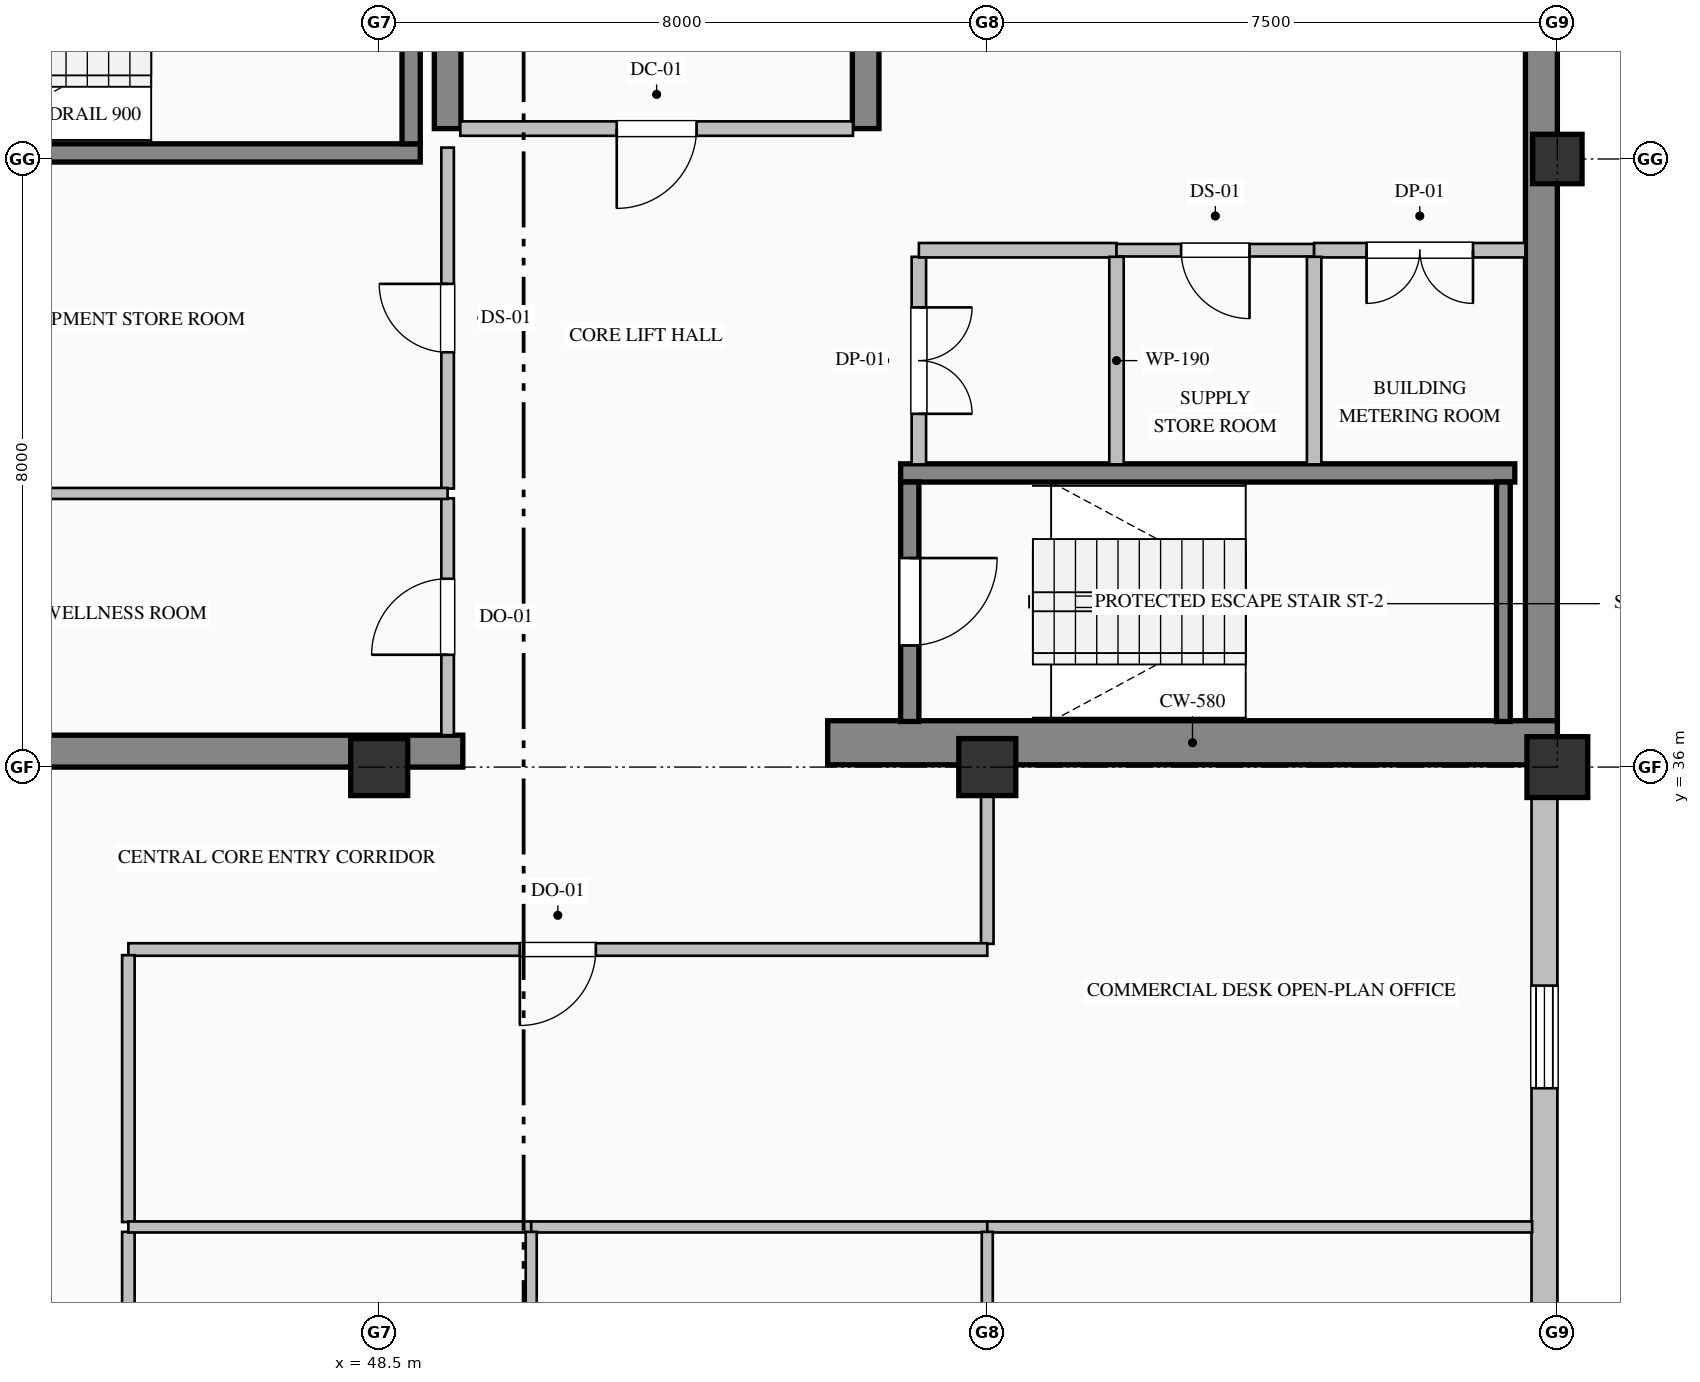
"""IFC4 building model, lengths in metres.
Left out: names, types, materials, properties, quantities, classifications, styles, units other than length and angle.
Written with IfcOpenShell. Run it as: python <this file> out.ifc"""

import sys

from ifc_helpers import new_model, si_unit, direction, frame, frame_2d, origin, origin_2d, place, context, subcontext, project, spatial, rectangle, hollow_rectangle, extrude, element, fill, save


model = new_model("IFC4")
c1 = context("Model", 3, precision=1e-05, world=origin(), true_north=direction((0.0, 1.0)))
c2 = subcontext(c1, "Body", "Model", "MODEL_VIEW")
j1 = project(units=[si_unit("LENGTHUNIT", "METRE"), si_unit("PLANEANGLEUNIT", "RADIAN")], contexts=[c1])
p1 = place(None, origin())
s1 = spatial("IfcSite", under=j1, at=p1, CompositionType="ELEMENT")
p2 = place(p1, origin())
s2 = spatial("IfcBuilding", under=s1, at=p2, CompositionType="ELEMENT")
p3 = place(p2, frame((0.0, 0.0, 355.2)))
s3 = spatial("IfcBuildingStorey", under=s2, at=p3, CompositionType="ELEMENT", Elevation=355.2)
p4 = place(p3, frame((63.79, 36.32, 0.0), z_axis=(0.0, 0.0, 1.0), x_axis=(0.0, 1.0, 0.0)))
e1 = element("IfcWall", 1, at=p4, inside=s3, PredefinedType="SHEAR", context=c2, shape_type="SweptSolid", body=[
    extrude(rectangle(XDim=15.26, YDim=0.42, at=frame_2d((7.63, 0.0))), origin(), (0.0, 0.0, 1.0), 3.785),
])
p5 = place(p3, frame((40.5, 36.21, 0.0), z_axis=(0.0, 0.0, 1.0), x_axis=(1.0, 0.0, 0.0)))
e2 = element("IfcWall", 2, at=p5, inside=s3, PredefinedType="SHEAR", context=c2, shape_type="SweptSolid", body=[
    extrude(rectangle(XDim=9.1, YDim=0.42, at=frame_2d((4.55, 0.0))), origin(), (0.0, 0.0, 1.0), 3.785),
])
p6 = place(p3, frame((54.4, 36.32, 0.0), z_axis=(0.0, 0.0, 1.0), x_axis=(1.0, 0.0, 0.0)))
e3 = element("IfcWall", 3, at=p6, inside=s3, PredefinedType="SHEAR", context=c2, shape_type="SweptSolid", body=[
    extrude(rectangle(XDim=9.6, YDim=0.58, at=frame_2d((4.8, 0.0))), origin(), (0.0, 0.0, 1.0), 4.0),
])
p7 = place(p3, frame((49.4, 44.4, 0.0), z_axis=(0.0, 0.0, 1.0), x_axis=(0.0, 1.0, 0.0)))
e4 = element("IfcWall", 4, at=p7, inside=s3, PredefinedType="SHEAR", context=c2, shape_type="SweptSolid", body=[
    extrude(rectangle(XDim=3.0, YDim=0.35, at=frame_2d((1.5, 0.0))), origin(), (0.0, 0.0, 1.0), 3.785),
])
p8 = place(p3, frame((54.9, 44.4, 0.0), z_axis=(0.0, 0.0, 1.0), x_axis=(0.0, 1.0, 0.0)))
e5 = element("IfcWall", 5, at=p8, inside=s3, PredefinedType="SHEAR", context=c2, shape_type="SweptSolid", body=[
    extrude(rectangle(XDim=7.18, YDim=0.35, at=frame_2d((3.59, 0.0))), origin(), (0.0, 0.0, 1.0), 3.785),
])
for number, where, z_axis, x_axis in (
    (6, (48.5, 36.0, 0.0), (0.0, 0.0, 1.0), (1.0, 0.0, 0.0)),
    (7, (56.5, 36.0, 0.0), (0.0, 0.0, 1.0), (1.0, 0.0, 0.0)),
):
    element("IfcColumn", number, at=place(p3, frame(where, z_axis=z_axis, x_axis=x_axis)), inside=s3, PredefinedType="COLUMN", context=c2, shape_type="SweptSolid", body=[
        extrude(rectangle(XDim=0.75, YDim=0.75, at=origin_2d()), origin(), (0.0, 0.0, 1.0), 4.0),
    ])
p9 = place(p3, frame((64.0, 36.0, 0.0), z_axis=(0.0, 0.0, 1.0), x_axis=(1.0, 0.0, 0.0)))
e8 = element("IfcColumn", 8, at=p9, inside=s3, PredefinedType="COLUMN", context=c2, shape_type="SweptSolid", body=[
    extrude(hollow_rectangle(XDim=0.8, YDim=0.8, WallThickness=0.032, at=origin_2d()), origin(), (0.0, 0.0, 1.0), 4.0),
])
p10 = place(p3, frame((64.0, 44.0, 0.0), z_axis=(0.0, 0.0, 1.0), x_axis=(1.0, 0.0, 0.0)))
e9 = element("IfcColumn", 9, at=p10, inside=s3, PredefinedType="COLUMN", context=c2, shape_type="SweptSolid", body=[
    extrude(hollow_rectangle(XDim=0.65, YDim=0.65, WallThickness=0.028, at=origin_2d()), origin(), (0.0, 0.0, 1.0), 4.0),
])
p11 = place(p3, frame((63.83, 36.05, 0.0), z_axis=(0.0, 0.0, 1.0), x_axis=(0.0, -1.0, 0.0)))
e10 = element("IfcWall", 10, at=p11, inside=s3, PredefinedType="SOLIDWALL", context=c2, shape_type="SweptSolid", body=[
    extrude(rectangle(XDim=13.55, YDim=0.34, at=frame_2d((6.775, 0.0))), origin(), (0.0, 0.0, 1.0), 3.335),
])
p12 = place(p11, frame((2.925, 0.0, 0.9)))
e11 = element("IfcOpeningElement", 11, at=p12, cuts=e10, PredefinedType="OPENING", context=c2, shape_type="SweptSolid", body=[
    extrude(rectangle(XDim=1.35, YDim=1.85, at=frame_2d((0.675, 0.925))), frame((0.0, 0.18, 0.0), z_axis=(0.0, -1.0, 0.0), x_axis=(1.0, 0.0, 0.0)), (0.0, 0.0, 1.0), 0.36),
])
p13 = place(p3, frame((49.04, 44.08, 0.0), z_axis=(0.0, 0.0, 1.0), x_axis=(-1.0, 0.0, 0.0)))
e12 = element("IfcWall", 12, at=p13, inside=s3, PredefinedType="SOLIDWALL", context=c2, shape_type="SweptSolid", body=[
    extrude(rectangle(XDim=8.08, YDim=0.24, at=frame_2d((4.04, 0.0))), origin(), (0.0, 0.0, 1.0), 4.0),
])
p14 = place(p3, frame((48.92, 44.2, 0.0), z_axis=(0.0, 0.0, 1.0), x_axis=(0.0, 1.0, 0.0)))
e13 = element("IfcWall", 13, at=p14, inside=s3, PredefinedType="SOLIDWALL", context=c2, shape_type="SweptSolid", body=[
    extrude(rectangle(XDim=3.15, YDim=0.24, at=frame_2d((1.575, 0.0))), origin(), (0.0, 0.0, 1.0), 4.0),
])
p15 = place(p3, frame((55.36, 39.87, 0.0), z_axis=(0.0, 0.0, 1.0), x_axis=(1.0, 0.0, 0.0)))
e14 = element("IfcWall", 14, at=p15, inside=s3, PredefinedType="SOLIDWALL", context=c2, shape_type="SweptSolid", body=[
    extrude(rectangle(XDim=8.08, YDim=0.24, at=frame_2d((4.04, 0.0))), origin(), (0.0, 0.0, 1.0), 4.0),
])
p16 = place(p3, frame((55.48, 39.75, 0.0), z_axis=(0.0, 0.0, 1.0), x_axis=(0.0, -1.0, 0.0)))
e15 = element("IfcWall", 15, at=p16, inside=s3, PredefinedType="SOLIDWALL", context=c2, shape_type="SweptSolid", body=[
    extrude(rectangle(XDim=3.15, YDim=0.24, at=frame_2d((1.575, 0.0))), origin(), (0.0, 0.0, 1.0), 4.0),
])
p17 = place(p16, frame((1.0, 0.0, 0.0)))
e16 = element("IfcOpeningElement", 16, at=p17, cuts=e15, PredefinedType="OPENING", context=c2, shape_type="SweptSolid", body=[
    extrude(rectangle(XDim=1.15, YDim=2.2, at=frame_2d((0.575, 1.1))), frame((0.0, 0.13, 0.0), z_axis=(0.0, -1.0, 0.0), x_axis=(1.0, 0.0, 0.0)), (0.0, 0.0, 1.0), 0.26),
])
p18 = place(p3, frame((63.29, 36.6, 0.0), z_axis=(0.0, 0.0, 1.0), x_axis=(0.0, 1.0, 0.0)))
e17 = element("IfcWall", 17, at=p18, inside=s3, PredefinedType="SOLIDWALL", context=c2, shape_type="SweptSolid", body=[
    extrude(rectangle(XDim=3.15, YDim=0.18, at=frame_2d((1.575, 0.0))), origin(), (0.0, 0.0, 1.0), 4.0),
])
p19 = place(p3, frame((54.733, 44.4, 0.0), z_axis=(0.0, 0.0, 1.0), x_axis=(-1.0, 0.0, 0.0)))
e18 = element("IfcWall", 18, at=p19, inside=s3, PredefinedType="PARTITIONING", context=c2, shape_type="SweptSolid", body=[
    extrude(rectangle(XDim=5.166, YDim=0.19, at=frame_2d((2.583, 0.0))), origin(), (0.0, 0.0, 1.0), 3.785),
])
p20 = place(p19, frame((2.058, 0.0, 0.0)))
e19 = element("IfcOpeningElement", 19, at=p20, cuts=e18, PredefinedType="OPENING", context=c2, shape_type="SweptSolid", body=[
    extrude(rectangle(XDim=1.05, YDim=2.15, at=frame_2d((0.525, 1.075))), frame((0.0, 0.105, 0.0), z_axis=(0.0, -1.0, 0.0), x_axis=(1.0, 0.0, 0.0)), (0.0, 0.0, 1.0), 0.21),
])
p21 = place(p3, frame((49.4, 36.42, 0.0), z_axis=(0.0, 0.0, 1.0), x_axis=(0.0, 1.0, 0.0)))
e20 = element("IfcWall", 20, at=p21, inside=s3, PredefinedType="PARTITIONING", context=c2, shape_type="SweptSolid", body=[
    extrude(rectangle(XDim=3.115, YDim=0.165, at=frame_2d((1.558, 0.0))), origin(), (0.0, 0.0, 1.0), 3.027),
])
p22 = place(p21, frame((1.058, 0.0, 0.0)))
e21 = element("IfcOpeningElement", 21, at=p22, cuts=e20, PredefinedType="OPENING", context=c2, shape_type="SweptSolid", body=[
    extrude(rectangle(XDim=1.0, YDim=2.15, at=frame_2d((0.5, 1.075))), frame((0.0, 0.093, 0.0), z_axis=(0.0, -1.0, 0.0), x_axis=(1.0, 0.0, 0.0)), (0.0, 0.0, 1.0), 0.185),
])
p23 = place(p3, frame((49.4, 39.665, 0.0), z_axis=(0.0, 0.0, 1.0), x_axis=(0.0, 1.0, 0.0)))
e22 = element("IfcWall", 22, at=p23, inside=s3, PredefinedType="PARTITIONING", context=c2, shape_type="SweptSolid", body=[
    extrude(rectangle(XDim=4.485, YDim=0.165, at=frame_2d((2.243, 0.0))), origin(), (0.0, 0.0, 1.0), 3.027),
])
p24 = place(p23, frame((1.793, 0.0, 0.0)))
e23 = element("IfcOpeningElement", 23, at=p24, cuts=e22, PredefinedType="OPENING", context=c2, shape_type="SweptSolid", body=[
    extrude(rectangle(XDim=0.9, YDim=2.15, at=frame_2d((0.45, 1.075))), frame((0.0, 0.093, 0.0), z_axis=(0.0, -1.0, 0.0), x_axis=(1.0, 0.0, 0.0)), (0.0, 0.0, 1.0), 0.185),
])
p25 = place(p3, frame((55.6, 42.713, 0.0), z_axis=(0.0, 0.0, 1.0), x_axis=(0.0, -1.0, 0.0)))
e24 = element("IfcWall", 24, at=p25, inside=s3, PredefinedType="PARTITIONING", context=c2, shape_type="SweptSolid", body=[
    extrude(rectangle(XDim=2.731, YDim=0.19, at=frame_2d((1.365, 0.0))), origin(), (0.0, 0.0, 1.0), 3.785),
])
p26 = place(p25, frame((0.666, 0.0, 0.0)))
e25 = element("IfcOpeningElement", 25, at=p26, cuts=e24, PredefinedType="OPENING", context=c2, shape_type="SweptSolid", body=[
    extrude(rectangle(XDim=1.4, YDim=2.25, at=frame_2d((0.7, 1.125))), frame((0.0, 0.105, 0.0), z_axis=(0.0, -1.0, 0.0), x_axis=(1.0, 0.0, 0.0)), (0.0, 0.0, 1.0), 0.21),
])
p27 = place(p3, frame((40.92, 39.6, 0.0), z_axis=(0.0, 0.0, 1.0), x_axis=(1.0, 0.0, 0.0)))
e26 = element("IfcWall", 26, at=p27, inside=s3, PredefinedType="PARTITIONING", context=c2, shape_type="SweptSolid", body=[
    extrude(rectangle(XDim=8.48, YDim=0.145, at=frame_2d((4.24, 0.0))), origin(), (0.0, 0.0, 1.0), 3.785),
])
p28 = place(p3, frame((58.2, 42.8, 0.0), z_axis=(0.0, 0.0, 1.0), x_axis=(-1.0, 0.0, 0.0)))
e27 = element("IfcWall", 27, at=p28, inside=s3, PredefinedType="PARTITIONING", context=c2, shape_type="SweptSolid", body=[
    extrude(rectangle(XDim=2.6, YDim=0.19, at=frame_2d((1.3, 0.0))), origin(), (0.0, 0.0, 1.0), 3.785),
])
p29 = place(p3, frame((60.8, 42.8, 0.0), z_axis=(0.0, 0.0, 1.0), x_axis=(-1.0, 0.0, 0.0)))
e28 = element("IfcWall", 28, at=p29, inside=s3, PredefinedType="PARTITIONING", context=c2, shape_type="SweptSolid", body=[
    extrude(rectangle(XDim=2.6, YDim=0.165, at=frame_2d((1.3, 0.0))), origin(), (0.0, 0.0, 1.0), 3.785),
])
p30 = place(p29, frame((0.85, 0.0, 0.0)))
e29 = element("IfcOpeningElement", 29, at=p30, cuts=e28, PredefinedType="OPENING", context=c2, shape_type="SweptSolid", body=[
    extrude(rectangle(XDim=0.9, YDim=2.15, at=frame_2d((0.45, 1.075))), frame((0.0, 0.093, 0.0), z_axis=(0.0, -1.0, 0.0), x_axis=(1.0, 0.0, 0.0)), (0.0, 0.0, 1.0), 0.185),
])
p31 = place(p3, frame((63.58, 42.8, 0.0), z_axis=(0.0, 0.0, 1.0), x_axis=(-1.0, 0.0, 0.0)))
e30 = element("IfcWall", 30, at=p31, inside=s3, PredefinedType="PARTITIONING", context=c2, shape_type="SweptSolid", body=[
    extrude(rectangle(XDim=2.78, YDim=0.19, at=frame_2d((1.39, 0.0))), origin(), (0.0, 0.0, 1.0), 3.785),
])
p32 = place(p31, frame((0.69, 0.0, 0.0)))
e31 = element("IfcOpeningElement", 31, at=p32, cuts=e30, PredefinedType="OPENING", context=c2, shape_type="SweptSolid", body=[
    extrude(rectangle(XDim=1.4, YDim=2.25, at=frame_2d((0.7, 1.125))), frame((0.0, 0.105, 0.0), z_axis=(0.0, -1.0, 0.0), x_axis=(1.0, 0.0, 0.0)), (0.0, 0.0, 1.0), 0.21),
])
for number, where, z_axis, x_axis in (
    (32, (58.2, 42.713, 0.0), (0.0, 0.0, 1.0), (0.0, -1.0, 0.0)),
    (33, (60.8, 42.713, 0.0), (0.0, 0.0, 1.0), (0.0, -1.0, 0.0)),
):
    element("IfcWall", number, at=place(p3, frame(where, z_axis=z_axis, x_axis=x_axis)), inside=s3, PredefinedType="PARTITIONING", context=c2, shape_type="SweptSolid", body=[
        extrude(rectangle(XDim=2.731, YDim=0.19, at=frame_2d((1.365, 0.0))), origin(), (0.0, 0.0, 1.0), 3.785),
    ])
p33 = place(p3, frame((56.5, 36.0, 0.0), z_axis=(0.0, 0.0, 1.0), x_axis=(0.0, -1.0, 0.0)))
e34 = element("IfcWall", 34, at=p33, inside=s3, PredefinedType="PARTITIONING", context=c2, shape_type="SweptSolid", body=[
    extrude(rectangle(XDim=2.325, YDim=0.165, at=frame_2d((1.163, 0.0))), origin(), (0.0, 0.0, 1.0), 3.177),
])
p34 = place(p3, frame((56.5, 33.6, 0.0), z_axis=(0.0, 0.0, 1.0), x_axis=(-1.0, 0.0, 0.0)))
e35 = element("IfcWall", 35, at=p34, inside=s3, PredefinedType="PARTITIONING", context=c2, shape_type="SweptSolid", body=[
    extrude(rectangle(XDim=11.3, YDim=0.165, at=frame_2d((5.65, 0.0))), origin(), (0.0, 0.0, 1.0), 3.785),
])
p35 = place(p34, frame((5.15, 0.0, 0.0)))
e36 = element("IfcOpeningElement", 36, at=p35, cuts=e35, PredefinedType="OPENING", context=c2, shape_type="SweptSolid", body=[
    extrude(rectangle(XDim=1.0, YDim=2.15, at=frame_2d((0.5, 1.075))), frame((0.0, 0.093, 0.0), z_axis=(0.0, -1.0, 0.0), x_axis=(1.0, 0.0, 0.0)), (0.0, 0.0, 1.0), 0.185),
])
p36 = place(p3, frame((45.2, 33.525, 0.0), z_axis=(0.0, 0.0, 1.0), x_axis=(0.0, -1.0, 0.0)))
e37 = element("IfcWall", 37, at=p36, inside=s3, PredefinedType="PARTITIONING", context=c2, shape_type="SweptSolid", body=[
    extrude(rectangle(XDim=3.511, YDim=0.165, at=frame_2d((1.755, 0.0))), origin(), (0.0, 0.0, 1.0), 3.785),
])
p37 = place(p3, frame((45.2, 29.885, 0.0), z_axis=(0.0, 0.0, 1.0), x_axis=(0.0, -1.0, 0.0)))
e38 = element("IfcWall", 38, at=p37, inside=s3, PredefinedType="PARTITIONING", context=c2, shape_type="SweptSolid", body=[
    extrude(rectangle(XDim=4.811, YDim=0.165, at=frame_2d((2.406, 0.0))), origin(), (0.0, 0.0, 1.0), 3.785),
])
p38 = place(p3, frame((50.5, 29.95, 0.0), z_axis=(0.0, 0.0, 1.0), x_axis=(-1.0, 0.0, 0.0)))
e39 = element("IfcWall", 39, at=p38, inside=s3, PredefinedType="PARTITIONING", context=c2, shape_type="SweptSolid", body=[
    extrude(rectangle(XDim=5.3, YDim=0.145, at=frame_2d((2.65, 0.0))), origin(), (0.0, 0.0, 1.0), 3.785),
])
p39 = place(p3, frame((56.5, 29.95, 0.0), z_axis=(0.0, 0.0, 1.0), x_axis=(-1.0, 0.0, 0.0)))
e40 = element("IfcWall", 40, at=p39, inside=s3, PredefinedType="PARTITIONING", context=c2, shape_type="SweptSolid", body=[
    extrude(rectangle(XDim=6.0, YDim=0.145, at=frame_2d((3.0, 0.0))), origin(), (0.0, 0.0, 1.0), 3.785),
])
p40 = place(p3, frame((63.668, 29.95, 0.0), z_axis=(0.0, 0.0, 1.0), x_axis=(-1.0, 0.0, 0.0)))
e41 = element("IfcWall", 41, at=p40, inside=s3, PredefinedType="PARTITIONING", context=c2, shape_type="SweptSolid", body=[
    extrude(rectangle(XDim=7.168, YDim=0.145, at=frame_2d((3.584, 0.0))), origin(), (0.0, 0.0, 1.0), 3.785),
])
p41 = place(p3, frame((50.5, 29.885, 0.0), z_axis=(0.0, 0.0, 1.0), x_axis=(0.0, -1.0, 0.0)))
e42 = element("IfcWall", 42, at=p41, inside=s3, PredefinedType="PARTITIONING", context=c2, shape_type="SweptSolid", body=[
    extrude(rectangle(XDim=4.811, YDim=0.145, at=frame_2d((2.406, 0.0))), origin(), (0.0, 0.0, 1.0), 3.785),
])
p42 = place(p3, frame((56.5, 29.885, 0.0), z_axis=(0.0, 0.0, 1.0), x_axis=(0.0, -1.0, 0.0)))
e43 = element("IfcWall", 43, at=p42, inside=s3, PredefinedType="PARTITIONING", context=c2, shape_type="SweptSolid", body=[
    extrude(rectangle(XDim=4.811, YDim=0.145, at=frame_2d((2.406, 0.0))), origin(), (0.0, 0.0, 1.0), 2.977),
])
p43 = place(p12, origin())
e44 = element("IfcWindow", 44, at=p43, inside=s3, PartitioningType="DOUBLE_PANEL_VERTICAL", PredefinedType="WINDOW", context=c2, shape_type="SweptSolid", body=[
    extrude(rectangle(XDim=1.35, YDim=1.85, at=frame_2d((0.675, 0.925))), frame((0.0, 0.15, 0.0), z_axis=(0.0, -1.0, 0.0), x_axis=(1.0, 0.0, 0.0)), (0.0, 0.0, 1.0), 0.06),
])
fill(e11, e44)
p44 = place(p17, origin())
e45 = element("IfcDoor", 45, at=p44, inside=s3, OperationType="SINGLE_SWING_LEFT", PredefinedType="DOOR", context=c2, shape_type="SweptSolid", body=[
    extrude(rectangle(XDim=1.15, YDim=2.2, at=frame_2d((0.575, 1.1))), frame((0.0, 0.025, 0.0), z_axis=(0.0, -1.0, 0.0), x_axis=(1.0, 0.0, 0.0)), (0.0, 0.0, 1.0), 0.05),
])
fill(e16, e45)
p45 = place(p20, origin())
e46 = element("IfcDoor", 46, at=p45, inside=s3, OperationType="SINGLE_SWING_RIGHT", PredefinedType="DOOR", context=c2, shape_type="SweptSolid", body=[
    extrude(rectangle(XDim=1.05, YDim=2.15, at=frame_2d((0.525, 1.075))), frame((0.0, 0.025, 0.0), z_axis=(0.0, -1.0, 0.0), x_axis=(1.0, 0.0, 0.0)), (0.0, 0.0, 1.0), 0.05),
])
fill(e19, e46)
p46 = place(p22, origin())
e47 = element("IfcDoor", 47, at=p46, inside=s3, OperationType="SINGLE_SWING_LEFT", PredefinedType="DOOR", context=c2, shape_type="SweptSolid", body=[
    extrude(rectangle(XDim=1.0, YDim=2.15, at=frame_2d((0.5, 1.075))), frame((0.0, 0.025, 0.0), z_axis=(0.0, -1.0, 0.0), x_axis=(1.0, 0.0, 0.0)), (0.0, 0.0, 1.0), 0.05),
])
fill(e21, e47)
p47 = place(p24, origin())
e48 = element("IfcDoor", 48, at=p47, inside=s3, OperationType="SINGLE_SWING_RIGHT", PredefinedType="DOOR", context=c2, shape_type="SweptSolid", body=[
    extrude(rectangle(XDim=0.9, YDim=2.15, at=frame_2d((0.45, 1.075))), frame((0.0, 0.025, 0.0), z_axis=(0.0, -1.0, 0.0), x_axis=(1.0, 0.0, 0.0)), (0.0, 0.0, 1.0), 0.05),
])
fill(e23, e48)
p48 = place(p26, origin())
e49 = element("IfcDoor", 49, at=p48, inside=s3, OperationType="DOUBLE_DOOR_SINGLE_SWING", PredefinedType="DOOR", context=c2, shape_type="SweptSolid", body=[
    extrude(rectangle(XDim=1.4, YDim=2.25, at=frame_2d((0.7, 1.125))), frame((0.0, 0.025, 0.0), z_axis=(0.0, -1.0, 0.0), x_axis=(1.0, 0.0, 0.0)), (0.0, 0.0, 1.0), 0.05),
])
fill(e25, e49)
p49 = place(p30, origin())
e50 = element("IfcDoor", 50, at=p49, inside=s3, OperationType="SINGLE_SWING_LEFT", PredefinedType="DOOR", context=c2, shape_type="SweptSolid", body=[
    extrude(rectangle(XDim=0.9, YDim=2.15, at=frame_2d((0.45, 1.075))), frame((0.0, 0.025, 0.0), z_axis=(0.0, -1.0, 0.0), x_axis=(1.0, 0.0, 0.0)), (0.0, 0.0, 1.0), 0.05),
])
fill(e29, e50)
p50 = place(p32, origin())
e51 = element("IfcDoor", 51, at=p50, inside=s3, OperationType="DOUBLE_DOOR_SINGLE_SWING", PredefinedType="DOOR", context=c2, shape_type="SweptSolid", body=[
    extrude(rectangle(XDim=1.4, YDim=2.25, at=frame_2d((0.7, 1.125))), frame((0.0, 0.025, 0.0), z_axis=(0.0, -1.0, 0.0), x_axis=(1.0, 0.0, 0.0)), (0.0, 0.0, 1.0), 0.05),
])
fill(e31, e51)
p51 = place(p35, origin())
e52 = element("IfcDoor", 52, at=p51, inside=s3, OperationType="SINGLE_SWING_RIGHT", PredefinedType="DOOR", context=c2, shape_type="SweptSolid", body=[
    extrude(rectangle(XDim=1.0, YDim=2.15, at=frame_2d((0.5, 1.075))), frame((0.0, 0.025, 0.0), z_axis=(0.0, -1.0, 0.0), x_axis=(1.0, 0.0, 0.0)), (0.0, 0.0, 1.0), 0.05),
])
fill(e36, e52)
save(model, sys.argv[1])
